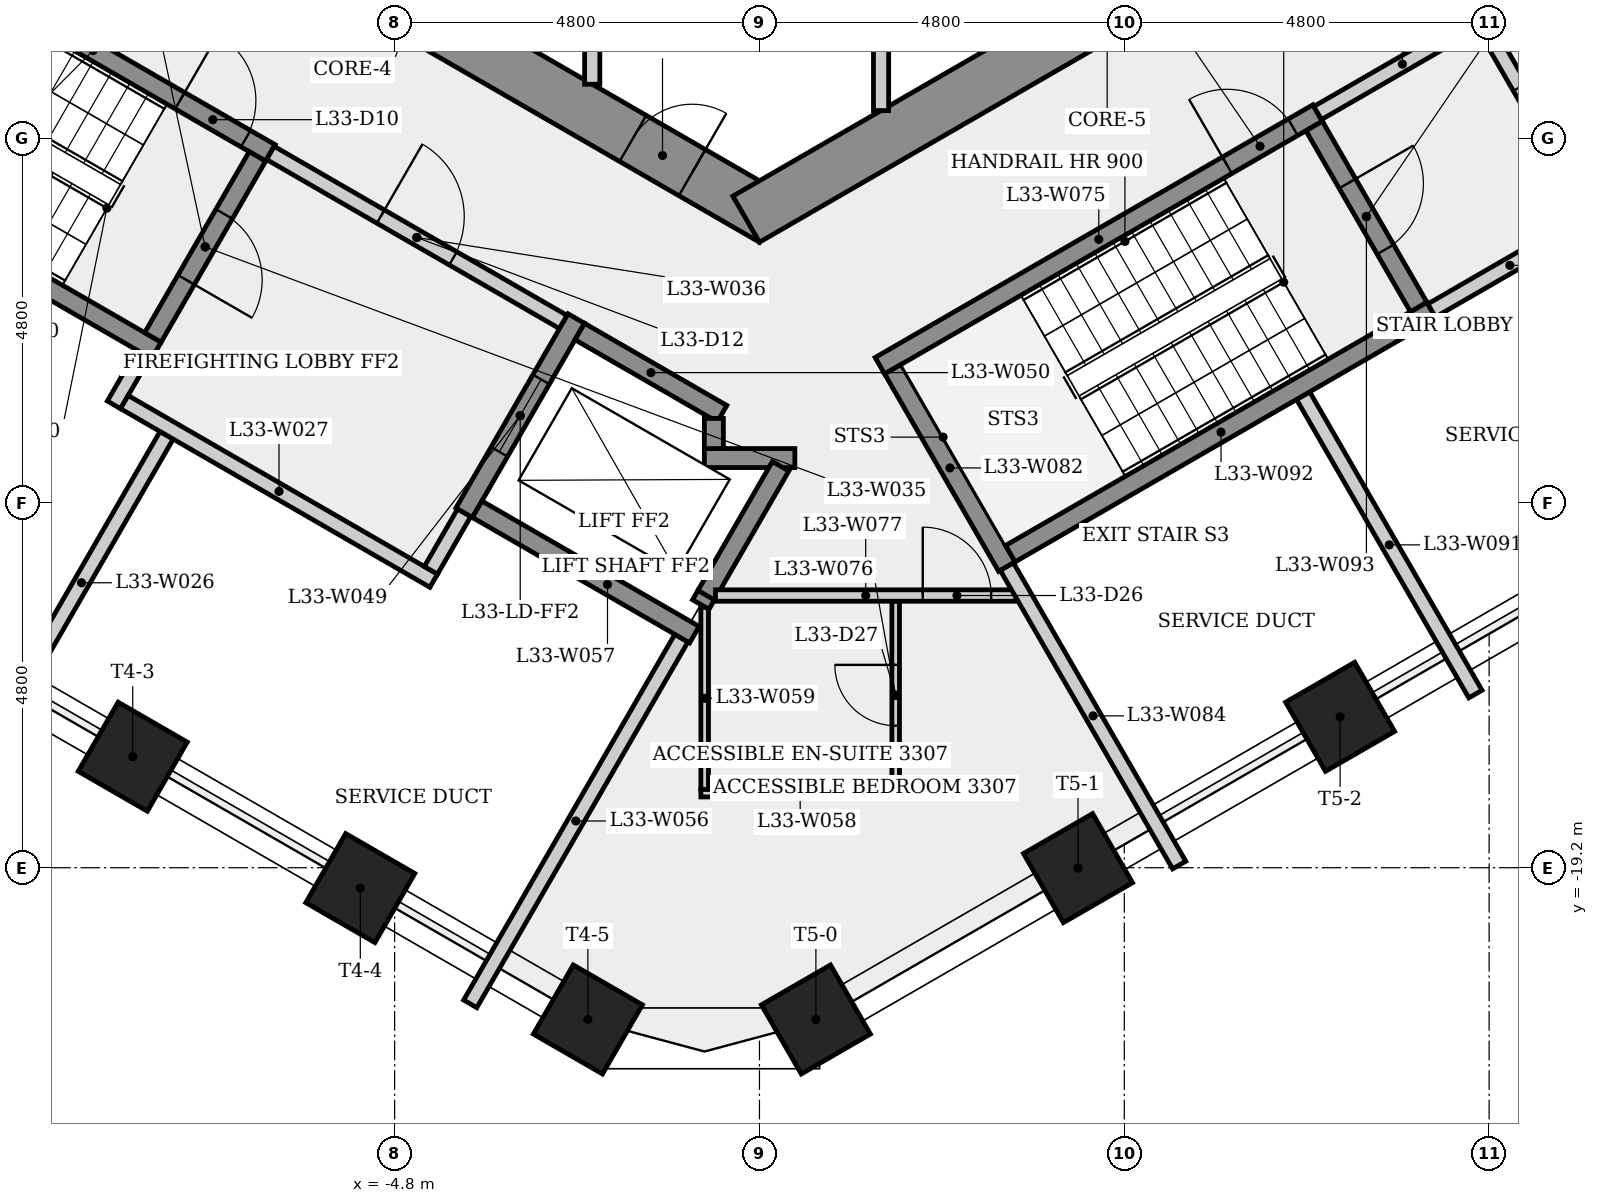
"""IFC4 building model, lengths in metres.
Left out: names, types, materials, properties, quantities, classifications, styles, units other than length and angle.
Written with IfcOpenShell. Run it as: python <this file> out.ifc"""

import sys

from ifc_helpers import new_model, si_unit, direction, frame, frame_2d, origin, origin_2d, place, context, subcontext, project, spatial, rectangle, extrude, element, fill, save


model = new_model("IFC4")
c1 = context("Model", 3, precision=1e-05, world=origin(), true_north=direction((0.0, 1.0)))
c2 = subcontext(c1, "Body", "Model", "MODEL_VIEW")
j1 = project(units=[si_unit("LENGTHUNIT", "METRE"), si_unit("PLANEANGLEUNIT", "RADIAN")], contexts=[c1])
p1 = place(None, origin())
s1 = spatial("IfcSite", under=j1, at=p1, CompositionType="ELEMENT")
p2 = place(p1, origin())
s2 = spatial("IfcBuilding", under=s1, at=p2, CompositionType="ELEMENT")
p3 = place(p2, frame((0.0, 0.0, 124.5)))
s3 = spatial("IfcBuildingStorey", under=s2, at=p3, CompositionType="ELEMENT", Elevation=124.5)
p4 = place(p3, frame((-9.325, -5.182, 0.0), z_axis=(0.0, 0.0, 1.0), x_axis=(0.866023993627, -0.500002442456, 0.0)))
e1 = element("IfcWall", 1, at=p4, inside=s3, PredefinedType="SHEAR", context=c2, shape_type="SweptSolid", body=[
    extrude(rectangle(XDim=10.97, YDim=0.7, at=frame_2d((5.485, 0.0))), origin(), (0.0, 0.0, 1.0), 4.0),
])
p5 = place(p4, frame((2.125, 0.0, 0.0)))
e2 = element("IfcOpeningElement", 2, at=p5, cuts=e1, PredefinedType="OPENING", context=c2, shape_type="SweptSolid", body=[
    extrude(rectangle(XDim=0.9, YDim=2.1, at=frame_2d((0.45, 1.05))), frame((0.0, 0.36, 0.0), z_axis=(0.0, -1.0, 0.0), x_axis=(1.0, 0.0, 0.0)), (0.0, 0.0, 1.0), 0.72),
])
p6 = place(p4, frame((8.845, 0.0, 0.0)))
e3 = element("IfcOpeningElement", 3, at=p6, cuts=e1, PredefinedType="OPENING", context=c2, shape_type="SweptSolid", body=[
    extrude(rectangle(XDim=0.9, YDim=2.1, at=frame_2d((0.45, 1.05))), frame((0.0, 0.36, 0.0), z_axis=(0.0, -1.0, 0.0), x_axis=(1.0, 0.0, 0.0)), (0.0, 0.0, 1.0), 0.72),
])
p7 = place(p3, frame((-0.175, -10.667, 0.0), z_axis=(0.0, 0.0, 1.0), x_axis=(0.866023993627, 0.500002442456, 0.0)))
e4 = element("IfcWall", 4, at=p7, inside=s3, PredefinedType="SHEAR", context=c2, shape_type="SweptSolid", body=[
    extrude(rectangle(XDim=10.97, YDim=0.7, at=frame_2d((5.485, 0.0))), origin(), (0.0, 0.0, 1.0), 4.0),
])
p8 = place(p7, frame((7.599, 0.0, 0.0)))
e5 = element("IfcOpeningElement", 5, at=p8, cuts=e4, PredefinedType="OPENING", context=c2, shape_type="SweptSolid", body=[
    extrude(rectangle(XDim=0.9, YDim=2.1, at=frame_2d((0.45, 1.05))), frame((0.0, 0.36, 0.0), z_axis=(0.0, -1.0, 0.0), x_axis=(1.0, 0.0, 0.0)), (0.0, 0.0, 1.0), 0.72),
])
for number, where, z_axis, x_axis in (
    (6, (-8.246, -17.739, 0.0), (0.0, 0.0, 1.0), (-0.5, -0.866, 0.0)),
    (7, (-5.252, -19.468, 0.0), (0.0, 0.0, 1.0), (-0.5, -0.866, 0.0)),
    (8, (-2.258, -21.197, 0.0), (0.0, 0.0, 1.0), (-0.5, -0.866, 0.0)),
    (9, (0.742, -21.197, 0.0), (0.0, 0.0, 1.0), (0.5, -0.866, 0.0)),
    (10, (4.191, -19.206, 0.0), (0.0, 0.0, 1.0), (0.5, -0.866, 0.0)),
    (11, (7.64, -17.214, 0.0), (0.0, 0.0, 1.0), (0.5, -0.866, 0.0)),
):
    element("IfcColumn", number, at=place(p3, frame(where, z_axis=z_axis, x_axis=x_axis)), inside=s3, PredefinedType="COLUMN", context=c2, shape_type="SweptSolid", body=[
        extrude(rectangle(XDim=1.05, YDim=1.05, at=origin_2d()), origin(), (0.0, 0.0, 1.0), 4.0),
    ])
p9 = place(p3, frame((-11.1, -7.101, 0.0), z_axis=(0.0, 0.0, 1.0), x_axis=(0.866028615007, -0.499994437958, 0.0)))
e12 = element("IfcWall", 12, at=p9, inside=s3, PredefinedType="SHEAR", context=c2, shape_type="SweptSolid", body=[
    extrude(rectangle(XDim=5.387, YDim=0.25, at=frame_2d((2.694, 0.0))), origin(), (0.0, 0.0, 1.0), 3.6),
])
p10 = place(p9, frame((4.012, 0.0, 0.0)))
e13 = element("IfcOpeningElement", 13, at=p10, cuts=e12, PredefinedType="OPENING", context=c2, shape_type="SweptSolid", body=[
    extrude(rectangle(XDim=1.0, YDim=2.1, at=frame_2d((0.5, 1.05))), frame((0.0, 0.135, 0.0), z_axis=(0.0, -1.0, 0.0), x_axis=(1.0, 0.0, 0.0)), (0.0, 0.0, 1.0), 0.27),
])
p11 = place(p3, frame((-8.493, -13.11, 0.0), z_axis=(0.0, 0.0, 1.0), x_axis=(0.500067724834, 0.865986299303, 0.0)))
e14 = element("IfcWall", 14, at=p11, inside=s3, PredefinedType="PLUMBINGWALL", context=c2, shape_type="SweptSolid", body=[
    extrude(rectangle(XDim=0.775, YDim=0.2, at=frame_2d((0.388, 0.0))), origin(), (0.0, 0.0, 1.0), 3.6),
])
p12 = place(p3, frame((-7.935, -12.393, 0.0), z_axis=(0.0, 0.0, 1.0), x_axis=(-0.866025499775, 0.499999833739, 0.0)))
e15 = element("IfcWall", 15, at=p12, inside=s3, PredefinedType="SHEAR", context=c2, shape_type="SweptSolid", body=[
    extrude(rectangle(XDim=6.4, YDim=0.25, at=frame_2d((3.2, 0.0))), origin(), (0.0, 0.0, 1.0), 3.6),
])
p13 = place(p3, frame((-7.8, -13.51, 0.0), z_axis=(0.0, 0.0, 1.0), x_axis=(-0.499994393058, -0.866028640929, 0.0)))
e16 = element("IfcWall", 16, at=p13, inside=s3, PredefinedType="PLUMBINGWALL", context=c2, shape_type="SweptSolid", body=[
    extrude(rectangle(XDim=4.481, YDim=0.2, at=frame_2d((2.241, 0.0))), origin(), (0.0, 0.0, 1.0), 3.6),
])
p14 = place(p3, frame((-8.356, -13.073, 0.0), z_axis=(0.0, 0.0, 1.0), x_axis=(0.866038532462, -0.499977259774, 0.0)))
e17 = element("IfcWall", 17, at=p14, inside=s3, PredefinedType="PLUMBINGWALL", context=c2, shape_type="SweptSolid", body=[
    extrude(rectangle(XDim=4.7, YDim=0.2, at=frame_2d((2.35, 0.0))), origin(), (0.0, 0.0, 1.0), 3.6),
])
p15 = place(p3, frame((-6.605, -9.841, 0.0), z_axis=(0.0, 0.0, 1.0), x_axis=(-0.499996545922, -0.866027397988, 0.0)))
e18 = element("IfcWall", 18, at=p15, inside=s3, PredefinedType="SHEAR", context=c2, shape_type="SweptSolid", body=[
    extrude(rectangle(XDim=2.75, YDim=0.25, at=frame_2d((1.375, 0.0))), origin(), (0.0, 0.0, 1.0), 3.6),
])
p16 = place(p15, frame((0.875, 0.0, 0.0)))
e19 = element("IfcOpeningElement", 19, at=p16, cuts=e18, PredefinedType="OPENING", context=c2, shape_type="SweptSolid", body=[
    extrude(rectangle(XDim=1.0, YDim=2.1, at=frame_2d((0.5, 1.05))), frame((0.0, 0.135, 0.0), z_axis=(0.0, -1.0, 0.0), x_axis=(1.0, 0.0, 0.0)), (0.0, 0.0, 1.0), 0.27),
])
p17 = place(p3, frame((-6.435, -9.795, 0.0), z_axis=(0.0, 0.0, 1.0), x_axis=(0.866012907634, -0.500021643343, 0.0)))
e20 = element("IfcWall", 20, at=p17, inside=s3, PredefinedType="PARTITIONING", context=c2, shape_type="SweptSolid", body=[
    extrude(rectangle(XDim=4.45, YDim=0.2, at=frame_2d((2.225, 0.0))), origin(), (0.0, 0.0, 1.0), 3.6),
])
p18 = place(p17, frame((1.675, 0.0, 0.0)))
e21 = element("IfcOpeningElement", 21, at=p18, cuts=e20, PredefinedType="OPENING", context=c2, shape_type="SweptSolid", body=[
    extrude(rectangle(XDim=1.1, YDim=2.1, at=frame_2d((0.55, 1.05))), frame((0.0, 0.11, 0.0), z_axis=(0.0, -1.0, 0.0), x_axis=(1.0, 0.0, 0.0)), (0.0, 0.0, 1.0), 0.22),
])
p19 = place(p3, frame((-3.885, -14.529, 0.0), z_axis=(0.0, 0.0, 1.0), x_axis=(-0.499859285417, -0.866106630146, 0.0)))
e22 = element("IfcWall", 22, at=p19, inside=s3, PredefinedType="PLUMBINGWALL", context=c2, shape_type="SweptSolid", body=[
    extrude(rectangle(XDim=0.875, YDim=0.2, at=frame_2d((0.438, 0.0))), origin(), (0.0, 0.0, 1.0), 3.6),
])
p20 = place(p3, frame((-2.41, -11.974, 0.0), z_axis=(0.0, 0.0, 1.0), x_axis=(-0.500001826776, -0.866024349092, 0.0)))
e23 = element("IfcWall", 23, at=p20, inside=s3, PredefinedType="SHEAR", context=c2, shape_type="SweptSolid", body=[
    extrude(rectangle(XDim=2.95, YDim=0.25, at=frame_2d((1.475, 0.0))), origin(), (0.0, 0.0, 1.0), 3.6),
])
p21 = place(p20, frame((0.925, 0.0, 0.0)))
e24 = element("IfcOpeningElement", 24, at=p21, cuts=e23, PredefinedType="OPENING", context=c2, shape_type="SweptSolid", body=[
    extrude(rectangle(XDim=1.1, YDim=2.1, at=frame_2d((0.55, 1.05))), frame((0.0, 0.135, 0.0), z_axis=(0.0, -1.0, 0.0), x_axis=(1.0, 0.0, 0.0)), (0.0, 0.0, 1.0), 0.27),
])
p22 = place(p3, frame((-2.364, -12.145, 0.0), z_axis=(0.0, 0.0, 1.0), x_axis=(0.86603892542, -0.499976579108, 0.0)))
e25 = element("IfcWall", 25, at=p22, inside=s3, PredefinedType="SHEAR", context=c2, shape_type="SweptSolid", body=[
    extrude(rectangle(XDim=2.162, YDim=0.25, at=frame_2d((1.081, 0.0))), origin(), (0.0, 0.0, 1.0), 3.6),
])
p23 = place(p3, frame((-2.2, -5.275, 0.0), z_axis=(0.0, 0.0, 1.0), x_axis=(0.0, -1.0, 0.0)))
e26 = element("IfcWall", 26, at=p23, inside=s3, PredefinedType="PARTITIONING", context=c2, shape_type="SweptSolid", body=[
    extrude(rectangle(XDim=3.616, YDim=0.2, at=frame_2d((1.808, 0.0))), origin(), (0.0, 0.0, 1.0), 3.6),
])
p24 = place(p3, frame((-1.027, -16.179, 0.0), z_axis=(0.0, 0.0, 1.0), x_axis=(-0.499995019066, -0.866028279509, 0.0)))
e27 = element("IfcWall", 27, at=p24, inside=s3, PredefinedType="PLUMBINGWALL", context=c2, shape_type="SweptSolid", body=[
    extrude(rectangle(XDim=5.557, YDim=0.2, at=frame_2d((2.778, 0.0))), origin(), (0.0, 0.0, 1.0), 3.6),
])
p25 = place(p3, frame((-0.856, -16.133, 0.0), z_axis=(0.0, 0.0, 1.0), x_axis=(-0.866021716278, 0.500006386895, 0.0)))
e28 = element("IfcWall", 28, at=p25, inside=s3, PredefinedType="SHEAR", context=c2, shape_type="SweptSolid", body=[
    extrude(rectangle(XDim=3.3, YDim=0.25, at=frame_2d((1.65, 0.0))), origin(), (0.0, 0.0, 1.0), 3.6),
])
p26 = place(p3, frame((-0.771, -18.219, 0.0), z_axis=(0.0, 0.0, 1.0), x_axis=(1.0, 0.0, 0.0)))
e29 = element("IfcWall", 29, at=p26, inside=s3, PredefinedType="PARTITIONING", context=c2, shape_type="SweptSolid", body=[
    extrude(rectangle(XDim=2.613, YDim=0.1, at=frame_2d((1.307, 0.0))), origin(), (0.0, 0.0, 1.0), 3.6),
])
p27 = place(p3, frame((-0.721, -15.774, 0.0), z_axis=(0.0, 0.0, 1.0), x_axis=(0.0, -1.0, 0.0)))
e30 = element("IfcWall", 30, at=p27, inside=s3, PredefinedType="PARTITIONING", context=c2, shape_type="SweptSolid", body=[
    extrude(rectangle(XDim=2.395, YDim=0.1, at=frame_2d((1.198, 0.0))), origin(), (0.0, 0.0, 1.0), 3.6),
])
p28 = place(p3, frame((-0.696, -15.605, 0.0), z_axis=(0.0, 0.0, 1.0), x_axis=(-0.500783975169, -0.865572302129, 0.0)))
e31 = element("IfcWall", 31, at=p28, inside=s3, PredefinedType="SHEAR", context=c2, shape_type="SweptSolid", body=[
    extrude(rectangle(XDim=0.153, YDim=0.25, at=frame_2d((0.076, 0.0))), origin(), (0.0, 0.0, 1.0), 4.0),
])
p29 = place(p3, frame((-0.725, -13.81, 0.0), z_axis=(0.0, 0.0, 1.0), x_axis=(1.0, 0.0, 0.0)))
e32 = element("IfcWall", 32, at=p29, inside=s3, PredefinedType="SHEAR", context=c2, shape_type="SweptSolid", body=[
    extrude(rectangle(XDim=1.191, YDim=0.25, at=frame_2d((0.595, 0.0))), origin(), (0.0, 0.0, 1.0), 3.6),
])
p30 = place(p3, frame((-0.6, -13.289, 0.0), z_axis=(0.0, 0.0, 1.0), x_axis=(0.0, -1.0, 0.0)))
e33 = element("IfcWall", 33, at=p30, inside=s3, PredefinedType="SHEAR", context=c2, shape_type="SweptSolid", body=[
    extrude(rectangle(XDim=0.396, YDim=0.25, at=frame_2d((0.198, 0.0))), origin(), (0.0, 0.0, 1.0), 4.0),
])
p31 = place(p3, frame((0.278, -13.918, 0.0), z_axis=(0.0, 0.0, 1.0), x_axis=(-0.499959831567, -0.866048593798, 0.0)))
e34 = element("IfcWall", 34, at=p31, inside=s3, PredefinedType="SHEAR", context=c2, shape_type="SweptSolid", body=[
    extrude(rectangle(XDim=1.959, YDim=0.25, at=frame_2d((0.979, 0.0))), origin(), (0.0, 0.0, 1.0), 4.0),
])
p32 = place(p3, frame((1.6, -5.275, 0.0), z_axis=(0.0, 0.0, 1.0), x_axis=(0.0, -1.0, 0.0)))
e35 = element("IfcWall", 35, at=p32, inside=s3, PredefinedType="PARTITIONING", context=c2, shape_type="SweptSolid", body=[
    extrude(rectangle(XDim=3.963, YDim=0.2, at=frame_2d((1.981, 0.0))), origin(), (0.0, 0.0, 1.0), 3.6),
])
p33 = place(p3, frame((1.585, -12.595, 0.0), z_axis=(0.0, 0.0, 1.0), x_axis=(0.866036417653, 0.499980922934, 0.0)))
e36 = element("IfcWall", 36, at=p33, inside=s3, PredefinedType="SHEAR", context=c2, shape_type="SweptSolid", body=[
    extrude(rectangle(XDim=6.65, YDim=0.25, at=frame_2d((3.325, 0.0))), origin(), (0.0, 0.0, 1.0), 3.6),
])
p34 = place(p33, frame((5.275, 0.0, 0.0)))
e37 = element("IfcOpeningElement", 37, at=p34, cuts=e36, PredefinedType="OPENING", context=c2, shape_type="SweptSolid", body=[
    extrude(rectangle(XDim=1.0, YDim=2.1, at=frame_2d((0.5, 1.05))), frame((0.0, 0.135, 0.0), z_axis=(0.0, -1.0, 0.0), x_axis=(1.0, 0.0, 0.0)), (0.0, 0.0, 1.0), 0.27),
])
p35 = place(p3, frame((1.792, -18.169, 0.0), z_axis=(0.0, 0.0, 1.0), x_axis=(0.0, 1.0, 0.0)))
e38 = element("IfcWall", 38, at=p35, inside=s3, PredefinedType="PARTITIONING", context=c2, shape_type="SweptSolid", body=[
    extrude(rectangle(XDim=2.475, YDim=0.1, at=frame_2d((1.238, 0.0))), origin(), (0.0, 0.0, 1.0), 3.6),
])
p36 = place(p35, frame((0.837, 0.0, 0.0)))
e39 = element("IfcOpeningElement", 39, at=p36, cuts=e38, PredefinedType="OPENING", context=c2, shape_type="SweptSolid", body=[
    extrude(rectangle(XDim=0.8, YDim=2.1, at=frame_2d((0.4, 1.05))), frame((0.0, 0.06, 0.0), z_axis=(0.0, -1.0, 0.0), x_axis=(1.0, 0.0, 0.0)), (0.0, 0.0, 1.0), 0.12),
])
p37 = place(p3, frame((-0.579, -15.619, 0.0), z_axis=(0.0, 0.0, 1.0), x_axis=(1.0, 0.0, 0.0)))
e40 = element("IfcWall", 40, at=p37, inside=s3, PredefinedType="PARTITIONING", context=c2, shape_type="SweptSolid", body=[
    extrude(rectangle(XDim=3.954, YDim=0.15, at=frame_2d((1.977, 0.0))), origin(), (0.0, 0.0, 1.0), 3.6),
])
p38 = place(p37, frame((2.727, 0.0, 0.0)))
e41 = element("IfcOpeningElement", 41, at=p38, cuts=e40, PredefinedType="OPENING", context=c2, shape_type="SweptSolid", body=[
    extrude(rectangle(XDim=0.9, YDim=2.1, at=frame_2d((0.45, 1.05))), frame((0.0, 0.085, 0.0), z_axis=(0.0, -1.0, 0.0), x_axis=(1.0, 0.0, 0.0)), (0.0, 0.0, 1.0), 0.17),
])
p39 = place(p3, frame((3.256, -15.239, 0.0), z_axis=(0.0, 0.0, 1.0), x_axis=(-0.50002537861, 0.866010750942, 0.0)))
e42 = element("IfcWall", 42, at=p39, inside=s3, PredefinedType="SHEAR", context=c2, shape_type="SweptSolid", body=[
    extrude(rectangle(XDim=3.0, YDim=0.25, at=frame_2d((1.5, 0.0))), origin(), (0.0, 0.0, 1.0), 3.6),
])
for number, where, z_axis, x_axis in (
    (43, (3.256, -15.239, 0.0), (0.0, 0.0, 1.0), (0.5, -0.866, 0.0)),
    (44, (7.153, -12.989, 0.0), (0.0, 0.0, 1.0), (0.5, -0.866, 0.0)),
):
    element("IfcWall", number, at=place(p3, frame(where, z_axis=z_axis, x_axis=x_axis)), inside=s3, PredefinedType="PLUMBINGWALL", context=c2, shape_type="SweptSolid", body=[
        extrude(rectangle(XDim=4.534, YDim=0.2, at=frame_2d((2.267, 0.0))), origin(), (0.0, 0.0, 1.0), 3.6),
    ])
p40 = place(p3, frame((3.301, -15.068, 0.0), z_axis=(0.0, 0.0, 1.0), x_axis=(0.866035036182, 0.499983315828, 0.0)))
e45 = element("IfcWall", 45, at=p40, inside=s3, PredefinedType="SHEAR", context=c2, shape_type="SweptSolid", body=[
    extrude(rectangle(XDim=6.4, YDim=0.25, at=frame_2d((3.2, 0.0))), origin(), (0.0, 0.0, 1.0), 4.0),
])
p41 = place(p3, frame((7.298, -9.441, 0.0), z_axis=(0.0, 0.0, 1.0), x_axis=(0.500034990121, -0.866005201286, 0.0)))
e46 = element("IfcWall", 46, at=p41, inside=s3, PredefinedType="SHEAR", context=c2, shape_type="SweptSolid", body=[
    extrude(rectangle(XDim=2.75, YDim=0.25, at=frame_2d((1.375, 0.0))), origin(), (0.0, 0.0, 1.0), 3.6),
])
p42 = place(p41, frame((0.875, 0.0, 0.0)))
e47 = element("IfcOpeningElement", 47, at=p42, cuts=e46, PredefinedType="OPENING", context=c2, shape_type="SweptSolid", body=[
    extrude(rectangle(XDim=1.0, YDim=2.1, at=frame_2d((0.5, 1.05))), frame((0.0, 0.135, 0.0), z_axis=(0.0, -1.0, 0.0), x_axis=(1.0, 0.0, 0.0)), (0.0, 0.0, 1.0), 0.27),
])
p43 = place(p3, frame((7.344, -9.27, 0.0), z_axis=(0.0, 0.0, 1.0), x_axis=(0.866005588531, 0.500034319456, 0.0)))
e48 = element("IfcWall", 48, at=p43, inside=s3, PredefinedType="PARTITIONING", context=c2, shape_type="SweptSolid", body=[
    extrude(rectangle(XDim=2.575, YDim=0.2, at=frame_2d((1.288, 0.0))), origin(), (0.0, 0.0, 1.0), 3.6),
])
p44 = place(p3, frame((9.537, -8.119, 0.0), z_axis=(0.0, 0.0, 1.0), x_axis=(0.499990139034, -0.866031096941, 0.0)))
e49 = element("IfcWall", 49, at=p44, inside=s3, PredefinedType="PARTITIONING", context=c2, shape_type="SweptSolid", body=[
    extrude(rectangle(XDim=3.0, YDim=0.2, at=frame_2d((1.5, 0.0))), origin(), (0.0, 0.0, 1.0), 3.6),
])
p45 = place(p44, frame((0.935, 0.0, 0.0)))
e50 = element("IfcOpeningElement", 50, at=p45, cuts=e49, PredefinedType="OPENING", context=c2, shape_type="SweptSolid", body=[
    extrude(rectangle(XDim=1.0, YDim=2.1, at=frame_2d((0.5, 1.05))), frame((0.0, 0.11, 0.0), z_axis=(0.0, -1.0, 0.0), x_axis=(1.0, 0.0, 0.0)), (0.0, 0.0, 1.0), 0.22),
])
p46 = place(p3, frame((10.901, -10.681, 0.0), z_axis=(0.0, 0.0, 1.0), x_axis=(-0.866007538022, -0.500030943131, 0.0)))
e51 = element("IfcWall", 51, at=p46, inside=s3, PredefinedType="PLUMBINGWALL", context=c2, shape_type="SweptSolid", body=[
    extrude(rectangle(XDim=2.375, YDim=0.2, at=frame_2d((1.188, 0.0))), origin(), (0.0, 0.0, 1.0), 3.6),
])
p47 = place(p10, origin())
e52 = element("IfcDoor", 52, at=p47, inside=s3, OperationType="SINGLE_SWING_LEFT", PredefinedType="DOOR", context=c2, shape_type="SweptSolid", body=[
    extrude(rectangle(XDim=1.0, YDim=2.1, at=frame_2d((0.5, 1.05))), frame((0.0, 0.025, 0.0), z_axis=(0.0, -1.0, 0.0), x_axis=(1.0, 0.0, 0.0)), (0.0, 0.0, 1.0), 0.05),
])
fill(e13, e52)
p48 = place(p16, origin())
e53 = element("IfcDoor", 53, at=p48, inside=s3, OperationType="SINGLE_SWING_RIGHT", PredefinedType="DOOR", context=c2, shape_type="SweptSolid", body=[
    extrude(rectangle(XDim=1.0, YDim=2.1, at=frame_2d((0.5, 1.05))), frame((0.0, 0.025, 0.0), z_axis=(0.0, -1.0, 0.0), x_axis=(1.0, 0.0, 0.0)), (0.0, 0.0, 1.0), 0.05),
])
fill(e19, e53)
p49 = place(p18, origin())
e54 = element("IfcDoor", 54, at=p49, inside=s3, OperationType="SINGLE_SWING_LEFT", PredefinedType="DOOR", context=c2, shape_type="SweptSolid", body=[
    extrude(rectangle(XDim=1.1, YDim=2.1, at=frame_2d((0.55, 1.05))), frame((0.0, 0.025, 0.0), z_axis=(0.0, -1.0, 0.0), x_axis=(1.0, 0.0, 0.0)), (0.0, 0.0, 1.0), 0.05),
])
fill(e21, e54)
p50 = place(p21, origin())
e55 = element("IfcDoor", 55, at=p50, inside=s3, OperationType="SLIDING_TO_LEFT", PredefinedType="DOOR", context=c2, shape_type="SweptSolid", body=[
    extrude(rectangle(XDim=1.1, YDim=2.1, at=frame_2d((0.55, 1.05))), frame((0.0, 0.025, 0.0), z_axis=(0.0, -1.0, 0.0), x_axis=(1.0, 0.0, 0.0)), (0.0, 0.0, 1.0), 0.05),
])
fill(e24, e55)
p51 = place(p34, origin())
e56 = element("IfcDoor", 56, at=p51, inside=s3, OperationType="SINGLE_SWING_LEFT", PredefinedType="DOOR", context=c2, shape_type="SweptSolid", body=[
    extrude(rectangle(XDim=1.0, YDim=2.1, at=frame_2d((0.5, 1.05))), frame((0.0, 0.025, 0.0), z_axis=(0.0, -1.0, 0.0), x_axis=(1.0, 0.0, 0.0)), (0.0, 0.0, 1.0), 0.05),
])
fill(e37, e56)
p52 = place(p45, origin())
e57 = element("IfcDoor", 57, at=p52, inside=s3, OperationType="SINGLE_SWING_RIGHT", PredefinedType="DOOR", context=c2, shape_type="SweptSolid", body=[
    extrude(rectangle(XDim=1.0, YDim=2.1, at=frame_2d((0.5, 1.05))), frame((0.0, 0.025, 0.0), z_axis=(0.0, -1.0, 0.0), x_axis=(1.0, 0.0, 0.0)), (0.0, 0.0, 1.0), 0.05),
])
fill(e50, e57)
p53 = place(p42, origin())
e58 = element("IfcDoor", 58, at=p53, inside=s3, OperationType="SINGLE_SWING_LEFT", PredefinedType="DOOR", context=c2, shape_type="SweptSolid", body=[
    extrude(rectangle(XDim=1.0, YDim=2.1, at=frame_2d((0.5, 1.05))), frame((0.0, 0.025, 0.0), z_axis=(0.0, -1.0, 0.0), x_axis=(1.0, 0.0, 0.0)), (0.0, 0.0, 1.0), 0.05),
])
fill(e47, e58)
p54 = place(p38, origin())
e59 = element("IfcDoor", 59, at=p54, inside=s3, OperationType="SINGLE_SWING_LEFT", PredefinedType="DOOR", context=c2, shape_type="SweptSolid", body=[
    extrude(rectangle(XDim=0.9, YDim=2.1, at=frame_2d((0.45, 1.05))), frame((0.0, 0.025, 0.0), z_axis=(0.0, -1.0, 0.0), x_axis=(1.0, 0.0, 0.0)), (0.0, 0.0, 1.0), 0.05),
])
fill(e41, e59)
p55 = place(p36, origin())
e60 = element("IfcDoor", 60, at=p55, inside=s3, OperationType="SINGLE_SWING_RIGHT", PredefinedType="DOOR", context=c2, shape_type="SweptSolid", body=[
    extrude(rectangle(XDim=0.8, YDim=2.1, at=frame_2d((0.4, 1.05))), frame((0.0, 0.025, 0.0), z_axis=(0.0, -1.0, 0.0), x_axis=(1.0, 0.0, 0.0)), (0.0, 0.0, 1.0), 0.05),
])
fill(e39, e60)
p56 = place(p6, origin())
e61 = element("IfcDoor", 61, at=p56, inside=s3, OperationType="SINGLE_SWING_RIGHT", PredefinedType="DOOR", context=c2, shape_type="SweptSolid", body=[
    extrude(rectangle(XDim=0.9, YDim=2.1, at=frame_2d((0.45, 1.05))), frame((0.0, 0.025, 0.0), z_axis=(0.0, -1.0, 0.0), x_axis=(1.0, 0.0, 0.0)), (0.0, 0.0, 1.0), 0.05),
])
fill(e3, e61)
save(model, sys.argv[1])
